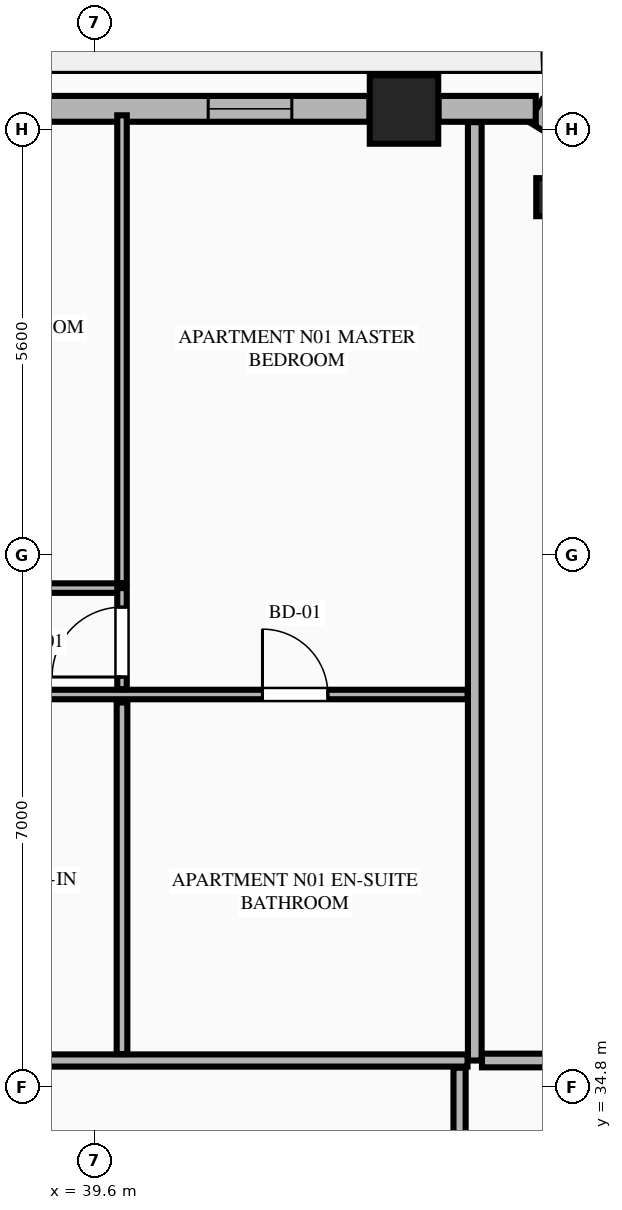
"""IFC4 building model, lengths in metres.
Left out: names, types, materials, properties, quantities, classifications, styles, units other than length and angle.
Written with IfcOpenShell. Run it as: python <this file> out.ifc"""

import sys

from ifc_helpers import new_model, si_unit, direction, frame, frame_2d, origin, origin_2d, place, context, subcontext, project, spatial, rectangle, extrude, element, fill, save


model = new_model("IFC4")
c1 = context("Model", 3, precision=1e-05, world=origin(), true_north=direction((0.0, 1.0)))
c2 = subcontext(c1, "Body", "Model", "MODEL_VIEW")
j1 = project(units=[si_unit("LENGTHUNIT", "METRE"), si_unit("PLANEANGLEUNIT", "RADIAN")], contexts=[c1])
p1 = place(None, origin())
s1 = spatial("IfcSite", under=j1, at=p1, CompositionType="ELEMENT")
p2 = place(p1, origin())
s2 = spatial("IfcBuilding", under=s1, at=p2, CompositionType="ELEMENT")
p3 = place(p2, frame((0.0, 0.0, 153.5)))
s3 = spatial("IfcBuildingStorey", under=s2, at=p3, CompositionType="ELEMENT", Elevation=153.5)
p4 = place(p3, frame((43.669, 47.661, 0.0), z_axis=(0.0, 0.0, 1.0), x_axis=(1.0, 0.0, 0.0)))
e1 = element("IfcColumn", 1, at=p4, inside=s3, PredefinedType="COLUMN", context=c2, shape_type="SweptSolid", body=[
    extrude(rectangle(XDim=0.9, YDim=0.9, at=origin_2d()), origin(), (0.0, 0.0, 1.0), 3.55),
])
p5 = place(p3, frame((45.659, 46.508, 0.0), z_axis=(0.0, 0.0, 1.0), x_axis=(-0.865160173452, 0.501495637342, 0.0)))
e2 = element("IfcColumn", 2, at=p5, inside=s3, PredefinedType="PILASTER", context=c2, shape_type="SweptSolid", body=[
    extrude(rectangle(XDim=0.5, YDim=0.35, at=origin_2d()), origin(), (0.0, 0.0, 1.0), 3.55),
])
p6 = place(p3, frame((46.971, 46.677, 0.0), z_axis=(0.0, 0.0, 1.0), x_axis=(-0.851798915137, 0.523868884523, 0.0)))
e3 = element("IfcWall", 3, at=p6, inside=s3, PredefinedType="STANDARD", context=c2, shape_type="SweptSolid", body=[
    extrude(rectangle(XDim=1.848, YDim=0.34, at=frame_2d((0.924, 0.0))), origin(), (0.0, 0.0, 1.0), 3.34),
])
p7 = place(p3, frame((45.402, 47.67, 0.0), z_axis=(0.0, 0.0, 1.0), x_axis=(-1.0, 0.0, 0.0)))
e4 = element("IfcWall", 4, at=p7, inside=s3, PredefinedType="STANDARD", context=c2, shape_type="SweptSolid", body=[
    extrude(rectangle(XDim=1.279, YDim=0.34, at=frame_2d((0.64, 0.0))), origin(), (0.0, 0.0, 1.0), 3.34),
])
p8 = place(p3, frame((43.215, 47.67, 0.0), z_axis=(0.0, 0.0, 1.0), x_axis=(-1.0, 0.0, 0.0)))
e5 = element("IfcWall", 5, at=p8, inside=s3, PredefinedType="STANDARD", context=c2, shape_type="SweptSolid", body=[
    extrude(rectangle(XDim=6.529, YDim=0.34, at=frame_2d((3.265, 0.0))), origin(), (0.0, 0.0, 1.0), 2.797),
])
p9 = place(p8, frame((1.022, 0.0, 0.75)))
e6 = element("IfcOpeningElement", 6, at=p9, cuts=e5, PredefinedType="OPENING", context=c2, shape_type="SweptSolid", body=[
    extrude(rectangle(XDim=1.1, YDim=1.897, at=frame_2d((0.55, 0.948))), frame((0.0, 0.18, 0.0), z_axis=(0.0, -1.0, 0.0), x_axis=(1.0, 0.0, 0.0)), (0.0, 0.0, 1.0), 0.36),
])
p10 = place(p8, frame((4.399, 0.0, 0.75)))
e7 = element("IfcOpeningElement", 7, at=p10, cuts=e5, PredefinedType="OPENING", context=c2, shape_type="SweptSolid", body=[
    extrude(rectangle(XDim=1.1, YDim=1.897, at=frame_2d((0.55, 0.948))), frame((0.0, 0.18, 0.0), z_axis=(0.0, -1.0, 0.0), x_axis=(1.0, 0.0, 0.0)), (0.0, 0.0, 1.0), 0.36),
])
p11 = place(p3, frame((44.6, 35.15, 0.0), z_axis=(0.0, 0.0, 1.0), x_axis=(0.0, 1.0, 0.0)))
e8 = element("IfcWall", 8, at=p11, inside=s3, PredefinedType="PARTITIONING", context=c2, shape_type="SweptSolid", body=[
    extrude(rectangle(XDim=12.345, YDim=0.18, at=frame_2d((6.173, 0.0))), origin(), (0.0, 0.0, 1.0), 3.34),
])
p12 = place(p3, frame((20.295, 35.15, 0.0), z_axis=(0.0, 0.0, 1.0), x_axis=(1.0, 0.0, 0.0)))
e9 = element("IfcWall", 9, at=p12, inside=s3, PredefinedType="PARTITIONING", context=c2, shape_type="SweptSolid", body=[
    extrude(rectangle(XDim=24.21, YDim=0.16, at=frame_2d((12.105, 0.0))), origin(), (0.0, 0.0, 1.0), 3.34),
])
p13 = place(p12, frame((0.405, 0.0, 0.0)))
e10 = element("IfcOpeningElement", 10, at=p13, cuts=e9, PredefinedType="OPENING", context=c2, shape_type="SweptSolid", body=[
    extrude(rectangle(XDim=1.35, YDim=2.35, at=frame_2d((0.675, 1.175))), frame((0.0, 0.09, 0.0), z_axis=(0.0, -1.0, 0.0), x_axis=(1.0, 0.0, 0.0)), (0.0, 0.0, 1.0), 0.18),
])
p14 = place(p3, frame((35.591, 39.965, 0.0), z_axis=(0.0, 0.0, 1.0), x_axis=(1.0, 0.0, 0.0)))
e11 = element("IfcWall", 11, at=p14, inside=s3, PredefinedType="PARTITIONING", context=c2, shape_type="SweptSolid", body=[
    extrude(rectangle(XDim=8.914, YDim=0.125, at=frame_2d((4.457, 0.0))), origin(), (0.0, 0.0, 1.0), 3.34),
])
p15 = place(p14, frame((6.216, 0.0, 0.0)))
e12 = element("IfcOpeningElement", 12, at=p15, cuts=e11, PredefinedType="OPENING", context=c2, shape_type="SweptSolid", body=[
    extrude(rectangle(XDim=0.86, YDim=2.1, at=frame_2d((0.43, 1.05))), frame((0.0, 0.073, 0.0), z_axis=(0.0, -1.0, 0.0), x_axis=(1.0, 0.0, 0.0)), (0.0, 0.0, 1.0), 0.145),
])
p16 = place(p14, frame((0.3, 0.0, 0.0)))
e13 = element("IfcOpeningElement", 13, at=p16, cuts=e11, PredefinedType="OPENING", context=c2, shape_type="SweptSolid", body=[
    extrude(rectangle(XDim=0.88, YDim=2.15, at=frame_2d((0.44, 1.075))), frame((0.0, 0.073, 0.0), z_axis=(0.0, -1.0, 0.0), x_axis=(1.0, 0.0, 0.0)), (0.0, 0.0, 1.0), 0.145),
])
p17 = place(p3, frame((30.95, 41.365, 0.0), z_axis=(0.0, 0.0, 1.0), x_axis=(1.0, 0.0, 0.0)))
e14 = element("IfcWall", 14, at=p17, inside=s3, PredefinedType="PARTITIONING", context=c2, shape_type="SweptSolid", body=[
    extrude(rectangle(XDim=9.009, YDim=0.125, at=frame_2d((4.504, 0.0))), origin(), (0.0, 0.0, 1.0), 3.34),
])
p18 = place(p17, frame((0.35, 0.0, 0.0)))
e15 = element("IfcOpeningElement", 15, at=p18, cuts=e14, PredefinedType="OPENING", context=c2, shape_type="SweptSolid", body=[
    extrude(rectangle(XDim=0.92, YDim=2.15, at=frame_2d((0.46, 1.075))), frame((0.0, 0.073, 0.0), z_axis=(0.0, -1.0, 0.0), x_axis=(1.0, 0.0, 0.0)), (0.0, 0.0, 1.0), 0.145),
])
p19 = place(p17, frame((4.991, 0.0, 0.0)))
e16 = element("IfcOpeningElement", 16, at=p19, cuts=e14, PredefinedType="OPENING", context=c2, shape_type="SweptSolid", body=[
    extrude(rectangle(XDim=0.92, YDim=2.15, at=frame_2d((0.46, 1.075))), frame((0.0, 0.073, 0.0), z_axis=(0.0, -1.0, 0.0), x_axis=(1.0, 0.0, 0.0)), (0.0, 0.0, 1.0), 0.145),
])
p20 = place(p3, frame((39.959, 40.035, 0.0), z_axis=(0.0, 0.0, 1.0), x_axis=(0.0, 1.0, 0.0)))
e17 = element("IfcWall", 17, at=p20, inside=s3, PredefinedType="PARTITIONING", context=c2, shape_type="SweptSolid", body=[
    extrude(rectangle(XDim=1.33, YDim=0.125, at=frame_2d((0.665, 0.0))), origin(), (0.0, 0.0, 1.0), 3.34),
])
p21 = place(p20, frame((0.16, 0.0, 0.0)))
e18 = element("IfcOpeningElement", 18, at=p21, cuts=e17, PredefinedType="OPENING", context=c2, shape_type="SweptSolid", body=[
    extrude(rectangle(XDim=0.92, YDim=2.15, at=frame_2d((0.46, 1.075))), frame((0.0, 0.073, 0.0), z_axis=(0.0, -1.0, 0.0), x_axis=(1.0, 0.0, 0.0)), (0.0, 0.0, 1.0), 0.145),
])
p22 = place(p3, frame((39.959, 41.43, 0.0), z_axis=(0.0, 0.0, 1.0), x_axis=(0.0, 1.0, 0.0)))
e19 = element("IfcWall", 19, at=p22, inside=s3, PredefinedType="PARTITIONING", context=c2, shape_type="SweptSolid", body=[
    extrude(rectangle(XDim=6.155, YDim=0.125, at=frame_2d((3.078, 0.0))), origin(), (0.0, 0.0, 1.0), 3.34),
])
p23 = place(p3, frame((39.959, 35.235, 0.0), z_axis=(0.0, 0.0, 1.0), x_axis=(0.0, 1.0, 0.0)))
e20 = element("IfcWall", 20, at=p23, inside=s3, PredefinedType="PLUMBINGWALL", context=c2, shape_type="SweptSolid", body=[
    extrude(rectangle(XDim=4.625, YDim=0.14, at=frame_2d((2.312, 0.0))), origin(), (0.0, 0.0, 1.0), 3.34),
])
p24 = place(p3, frame((44.695, 35.15, 0.0), z_axis=(0.0, 0.0, 1.0), x_axis=(1.0, 0.0, 0.0)))
e21 = element("IfcWall", 21, at=p24, inside=s3, PredefinedType="PARTITIONING", context=c2, shape_type="SweptSolid", body=[
    extrude(rectangle(XDim=7.895, YDim=0.18, at=frame_2d((3.948, 0.0))), origin(), (0.0, 0.0, 1.0), 3.34),
])
p25 = place(p3, frame((44.4, 16.745, 0.0), z_axis=(0.0, 0.0, 1.0), x_axis=(0.0, 1.0, 0.0)))
e22 = element("IfcWall", 22, at=p25, inside=s3, PredefinedType="PARTITIONING", context=c2, shape_type="SweptSolid", body=[
    extrude(rectangle(XDim=18.31, YDim=0.16, at=frame_2d((9.155, 0.0))), origin(), (0.0, 0.0, 1.0), 3.34),
])
p26 = place(p25, frame((0.45, 0.0, 0.0)))
e23 = element("IfcOpeningElement", 23, at=p26, cuts=e22, PredefinedType="OPENING", context=c2, shape_type="SweptSolid", body=[
    extrude(rectangle(XDim=1.02, YDim=2.25, at=frame_2d((0.51, 1.125))), frame((0.0, 0.09, 0.0), z_axis=(0.0, -1.0, 0.0), x_axis=(1.0, 0.0, 0.0)), (0.0, 0.0, 1.0), 0.18),
])
p27 = place(p9, origin())
e24 = element("IfcWindow", 24, at=p27, inside=s3, PartitioningType="SINGLE_PANEL", PredefinedType="WINDOW", context=c2, shape_type="SweptSolid", body=[
    extrude(rectangle(XDim=1.1, YDim=1.897, at=frame_2d((0.55, 0.948))), frame((0.0, 0.03, 0.0), z_axis=(0.0, -1.0, 0.0), x_axis=(1.0, 0.0, 0.0)), (0.0, 0.0, 1.0), 0.06),
])
fill(e6, e24)
p28 = place(p15, origin())
e25 = element("IfcDoor", 25, at=p28, inside=s3, OperationType="SINGLE_SWING_LEFT", PredefinedType="DOOR", context=c2, shape_type="SweptSolid", body=[
    extrude(rectangle(XDim=0.86, YDim=2.1, at=frame_2d((0.43, 1.05))), frame((0.0, 0.025, 0.0), z_axis=(0.0, -1.0, 0.0), x_axis=(1.0, 0.0, 0.0)), (0.0, 0.0, 1.0), 0.05),
])
fill(e12, e25)
p29 = place(p21, origin())
e26 = element("IfcDoor", 26, at=p29, inside=s3, OperationType="SINGLE_SWING_LEFT", PredefinedType="DOOR", context=c2, shape_type="SweptSolid", body=[
    extrude(rectangle(XDim=0.92, YDim=2.15, at=frame_2d((0.46, 1.075))), frame((0.0, 0.025, 0.0), z_axis=(0.0, -1.0, 0.0), x_axis=(1.0, 0.0, 0.0)), (0.0, 0.0, 1.0), 0.05),
])
fill(e18, e26)
save(model, sys.argv[1])
